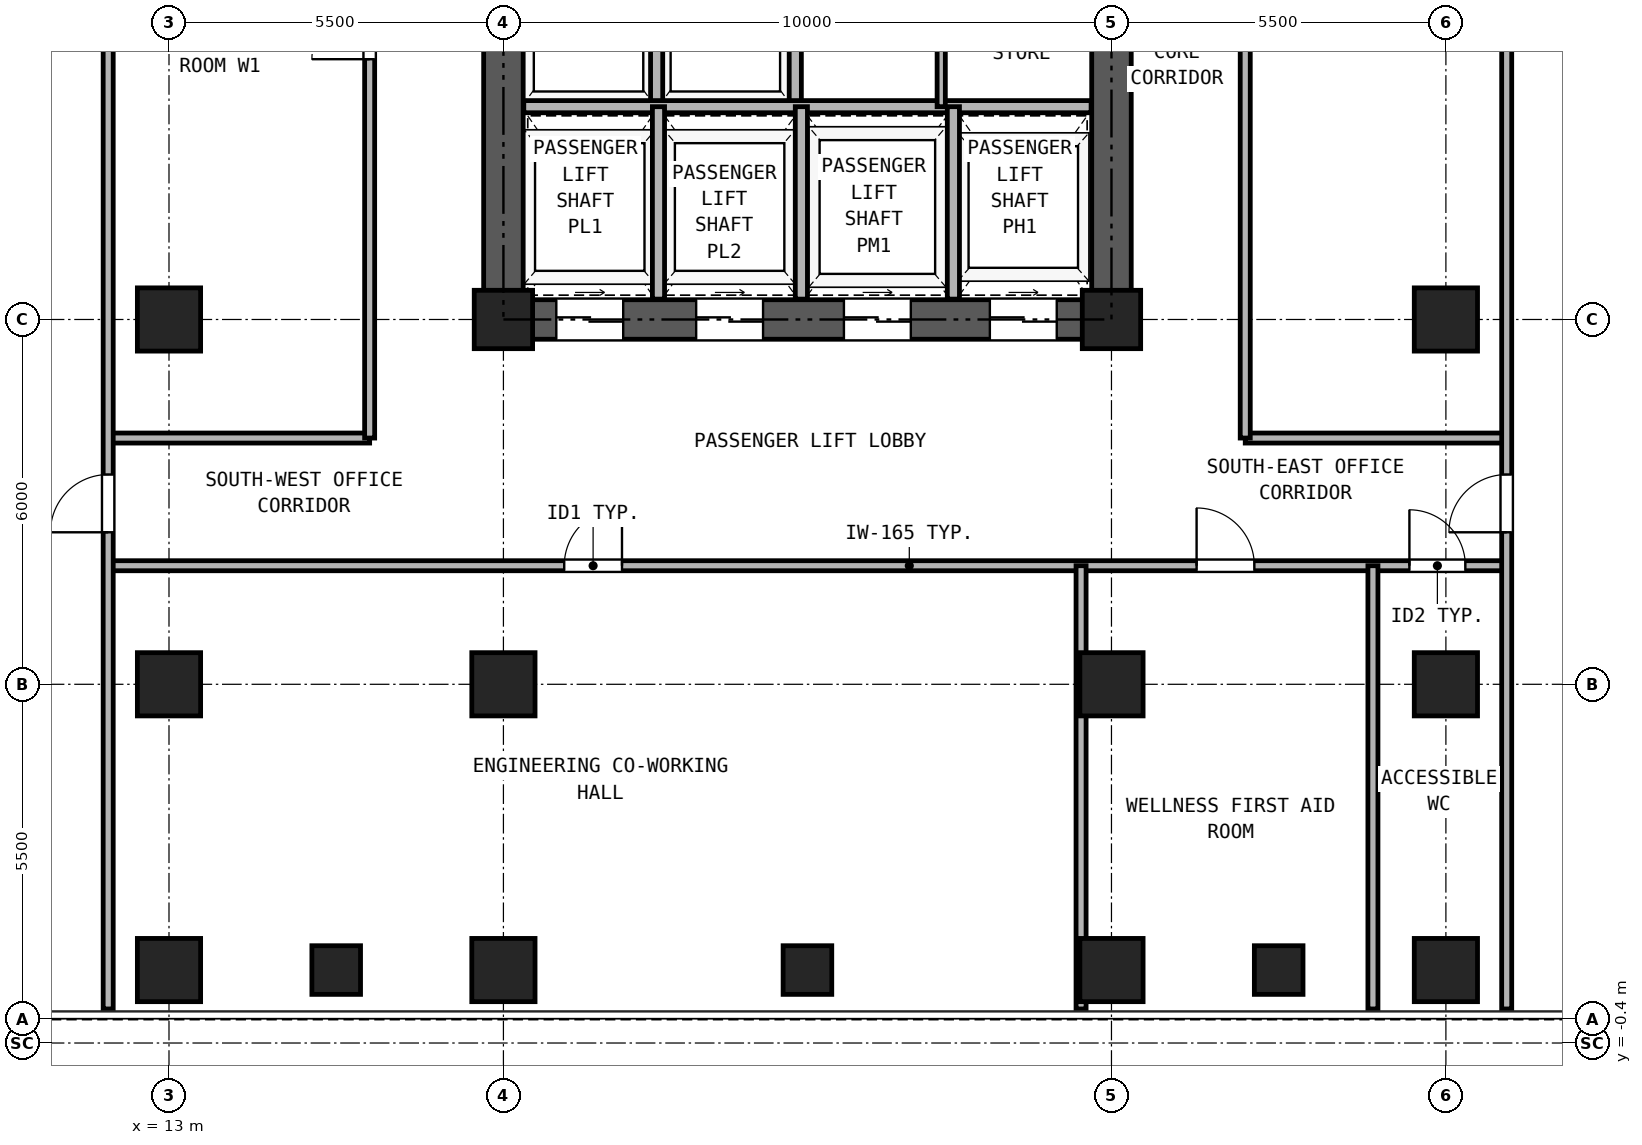
"""IFC4 building model, lengths in metres.
Left out: names, types, materials, properties, quantities, classifications, styles, units other than length and angle.
Written with IfcOpenShell. Run it as: python <this file> out.ifc"""

import sys

from ifc_helpers import new_model, si_unit, direction, frame, frame_2d, origin, origin_2d, place, context, subcontext, project, spatial, rectangle, hollow_rectangle, extrude, source, transform, mapped, element, fill, save


model = new_model("IFC4")
c1 = context("Model", 3, precision=1e-05, world=origin(), true_north=direction((0.0, 1.0)))
c2 = subcontext(c1, "Body", "Model", "MODEL_VIEW")
j1 = project(units=[si_unit("LENGTHUNIT", "METRE"), si_unit("PLANEANGLEUNIT", "RADIAN")], contexts=[c1])
p1 = place(None, origin())
s1 = spatial("IfcSite", under=j1, at=p1, CompositionType="ELEMENT")
p2 = place(p1, origin())
s2 = spatial("IfcBuilding", under=s1, at=p2, CompositionType="ELEMENT")
p3 = place(p2, frame((0.0, 0.0, 58.5)))
s3 = spatial("IfcBuildingStorey", under=s2, at=p3, CompositionType="ELEMENT", Elevation=58.5)
m1 = source(origin(), c2, "Body", "SweptSolid", [
    extrude(hollow_rectangle(XDim=1.04, YDim=1.04, WallThickness=0.065, at=origin_2d()), origin(), (0.0, 0.0, 1.0), 3.32),
])
for number, where, z_axis, x_axis in (
    (1, (13.0, 0.8, 0.0), (0.0, 0.0, 1.0), (1.0, 0.0, 0.0)),
    (2, (18.5, 0.8, 0.0), (0.0, 0.0, 1.0), (1.0, 0.0, 0.0)),
    (3, (28.5, 0.8, 0.0), (0.0, 0.0, 1.0), (1.0, 0.0, 0.0)),
    (4, (34.0, 0.8, 0.0), (0.0, 0.0, 1.0), (1.0, 0.0, 0.0)),
    (5, (13.0, 5.5, 0.0), (0.0, 0.0, 1.0), (1.0, 0.0, 0.0)),
    (6, (13.0, 11.5, 0.0), (0.0, 0.0, 1.0), (1.0, 0.0, 0.0)),
    (7, (18.5, 5.5, 0.0), (0.0, 0.0, 1.0), (1.0, 0.0, 0.0)),
):
    element("IfcColumn", number, at=place(p3, frame(where, z_axis=z_axis, x_axis=x_axis)), inside=s3, PredefinedType="COLUMN", context=c2, shape_type="MappedRepresentation", body=[
        mapped(m1, transform((0.0, 0.0, 0.0), x_axis=(1.0, 0.0, 0.0), y_axis=(0.0, 1.0, 0.0), z_axis=(0.0, 0.0, 1.0), scale=1.0)),
    ])
m2 = source(origin(), c2, "Body", "SweptSolid", [
    extrude(hollow_rectangle(XDim=0.96, YDim=0.96, WallThickness=0.06, at=origin_2d()), origin(), (0.0, 0.0, 1.0), 3.32),
])
p4 = place(p3, frame((18.5, 11.5, 0.0), z_axis=(0.0, 0.0, 1.0), x_axis=(1.0, 0.0, 0.0)))
e8 = element("IfcColumn", 8, at=p4, inside=s3, PredefinedType="COLUMN", context=c2, shape_type="MappedRepresentation", body=[
    mapped(m2, transform((0.0, 0.0, 0.0), x_axis=(1.0, 0.0, 0.0), y_axis=(0.0, 1.0, 0.0), z_axis=(0.0, 0.0, 1.0), scale=1.0)),
])
p5 = place(p3, frame((28.5, 5.5, 0.0), z_axis=(0.0, 0.0, 1.0), x_axis=(1.0, 0.0, 0.0)))
e9 = element("IfcColumn", 9, at=p5, inside=s3, PredefinedType="COLUMN", context=c2, shape_type="MappedRepresentation", body=[
    mapped(m1, transform((0.0, 0.0, 0.0), x_axis=(1.0, 0.0, 0.0), y_axis=(0.0, 1.0, 0.0), z_axis=(0.0, 0.0, 1.0), scale=1.0)),
])
p6 = place(p3, frame((28.5, 11.5, 0.0), z_axis=(0.0, 0.0, 1.0), x_axis=(1.0, 0.0, 0.0)))
e10 = element("IfcColumn", 10, at=p6, inside=s3, PredefinedType="COLUMN", context=c2, shape_type="MappedRepresentation", body=[
    mapped(m2, transform((0.0, 0.0, 0.0), x_axis=(1.0, 0.0, 0.0), y_axis=(0.0, 1.0, 0.0), z_axis=(0.0, 0.0, 1.0), scale=1.0)),
])
for number, where, z_axis, x_axis in (
    (11, (34.0, 5.5, 0.0), (0.0, 0.0, 1.0), (1.0, 0.0, 0.0)),
    (12, (34.0, 11.5, 0.0), (0.0, 0.0, 1.0), (1.0, 0.0, 0.0)),
):
    element("IfcColumn", number, at=place(p3, frame(where, z_axis=z_axis, x_axis=x_axis)), inside=s3, PredefinedType="COLUMN", context=c2, shape_type="MappedRepresentation", body=[
        mapped(m1, transform((0.0, 0.0, 0.0), x_axis=(1.0, 0.0, 0.0), y_axis=(0.0, 1.0, 0.0), z_axis=(0.0, 0.0, 1.0), scale=1.0)),
    ])
m3 = source(origin(), c2, "Body", "SweptSolid", [
    extrude(hollow_rectangle(XDim=0.8, YDim=0.8, WallThickness=0.045, at=origin_2d()), origin(), (0.0, 0.0, 1.0), 3.32),
])
for number, where, z_axis, x_axis in (
    (13, (15.75, 0.8, 0.0), (0.0, 0.0, 1.0), (1.0, 0.0, 0.0)),
    (14, (23.5, 0.8, 0.0), (0.0, 0.0, 1.0), (1.0, 0.0, 0.0)),
    (15, (31.25, 0.8, 0.0), (0.0, 0.0, 1.0), (1.0, 0.0, 0.0)),
):
    element("IfcColumn", number, at=place(p3, frame(where, z_axis=z_axis, x_axis=x_axis)), inside=s3, PredefinedType="COLUMN", context=c2, shape_type="MappedRepresentation", body=[
        mapped(m3, transform((0.0, 0.0, 0.0), x_axis=(1.0, 0.0, 0.0), y_axis=(0.0, 1.0, 0.0), z_axis=(0.0, 0.0, 1.0), scale=1.0)),
    ])
p7 = place(p3, frame((18.175, 11.5, 0.0), z_axis=(0.0, 0.0, 1.0), x_axis=(1.0, 0.0, 0.0)))
e16 = element("IfcWall", 16, at=p7, inside=s3, PredefinedType="SHEAR", context=c2, shape_type="SweptSolid", body=[
    extrude(rectangle(XDim=10.65, YDim=0.65, at=frame_2d((5.325, 0.0))), origin(), (0.0, 0.0, 1.0), 3.32),
])
p8 = place(p7, frame((1.195, 0.0, 0.0)))
e17 = element("IfcOpeningElement", 17, at=p8, cuts=e16, PredefinedType="OPENING", context=c2, shape_type="SweptSolid", body=[
    extrude(rectangle(XDim=1.1, YDim=2.25, at=frame_2d((0.55, 1.125))), frame((0.0, 0.335, 0.0), z_axis=(0.0, -1.0, 0.0), x_axis=(1.0, 0.0, 0.0)), (0.0, 0.0, 1.0), 0.67),
])
p9 = place(p7, frame((3.495, 0.0, 0.0)))
e18 = element("IfcOpeningElement", 18, at=p9, cuts=e16, PredefinedType="OPENING", context=c2, shape_type="SweptSolid", body=[
    extrude(rectangle(XDim=1.1, YDim=2.25, at=frame_2d((0.55, 1.125))), frame((0.0, 0.335, 0.0), z_axis=(0.0, -1.0, 0.0), x_axis=(1.0, 0.0, 0.0)), (0.0, 0.0, 1.0), 0.67),
])
p10 = place(p7, frame((5.925, 0.0, 0.0)))
e19 = element("IfcOpeningElement", 19, at=p10, cuts=e16, PredefinedType="OPENING", context=c2, shape_type="SweptSolid", body=[
    extrude(rectangle(XDim=1.1, YDim=2.25, at=frame_2d((0.55, 1.125))), frame((0.0, 0.335, 0.0), z_axis=(0.0, -1.0, 0.0), x_axis=(1.0, 0.0, 0.0)), (0.0, 0.0, 1.0), 0.67),
])
p11 = place(p7, frame((8.325, 0.0, 0.0)))
e20 = element("IfcOpeningElement", 20, at=p11, cuts=e16, PredefinedType="OPENING", context=c2, shape_type="SweptSolid", body=[
    extrude(rectangle(XDim=1.1, YDim=2.25, at=frame_2d((0.55, 1.125))), frame((0.0, 0.335, 0.0), z_axis=(0.0, -1.0, 0.0), x_axis=(1.0, 0.0, 0.0)), (0.0, 0.0, 1.0), 0.67),
])
p12 = place(p3, frame((18.5, 11.825, 0.0), z_axis=(0.0, 0.0, 1.0), x_axis=(0.0, 1.0, 0.0)))
e21 = element("IfcWall", 21, at=p12, inside=s3, PredefinedType="SHEAR", context=c2, shape_type="SweptSolid", body=[
    extrude(rectangle(XDim=16.6, YDim=0.65, at=frame_2d((8.3, 0.0))), origin(), (0.0, 0.0, 1.0), 3.32),
])
p13 = place(p12, frame((7.325, 0.0, 0.0)))
e22 = element("IfcOpeningElement", 22, at=p13, cuts=e21, PredefinedType="OPENING", context=c2, shape_type="SweptSolid", body=[
    extrude(rectangle(XDim=1.15, YDim=2.2, at=frame_2d((0.575, 1.1))), frame((0.0, 0.335, 0.0), z_axis=(0.0, -1.0, 0.0), x_axis=(1.0, 0.0, 0.0)), (0.0, 0.0, 1.0), 0.67),
])
p14 = place(p3, frame((28.5, 11.825, 0.0), z_axis=(0.0, 0.0, 1.0), x_axis=(0.0, 1.0, 0.0)))
e23 = element("IfcWall", 23, at=p14, inside=s3, PredefinedType="SHEAR", context=c2, shape_type="SweptSolid", body=[
    extrude(rectangle(XDim=16.6, YDim=0.65, at=frame_2d((8.3, 0.0))), origin(), (0.0, 0.0, 1.0), 3.32),
])
p15 = place(p14, frame((7.325, 0.0, 0.0)))
e24 = element("IfcOpeningElement", 24, at=p15, cuts=e23, PredefinedType="OPENING", context=c2, shape_type="SweptSolid", body=[
    extrude(rectangle(XDim=1.15, YDim=2.2, at=frame_2d((0.575, 1.1))), frame((0.0, 0.335, 0.0), z_axis=(0.0, -1.0, 0.0), x_axis=(1.0, 0.0, 0.0)), (0.0, 0.0, 1.0), 0.67),
])
for number, where, z_axis, x_axis in (
    (25, (21.02, 15.0, 0.0), (0.0, 0.0, 1.0), (0.0, 1.0, 0.0)),
    (26, (23.3, 15.0, 0.0), (0.0, 0.0, 1.0), (0.0, 1.0, 0.0)),
):
    element("IfcWall", number, at=place(p3, frame(where, z_axis=z_axis, x_axis=x_axis)), inside=s3, PredefinedType="PARTITIONING", context=c2, shape_type="SweptSolid", body=[
        extrude(rectangle(XDim=3.0, YDim=0.2, at=frame_2d((1.5, 0.0))), origin(), (0.0, 0.0, 1.0), 3.32),
    ])
p16 = place(p3, frame((18.835, 15.0, 0.0), z_axis=(0.0, 0.0, 1.0), x_axis=(1.0, 0.0, 0.0)))
e27 = element("IfcWall", 27, at=p16, inside=s3, PredefinedType="PARTITIONING", context=c2, shape_type="SweptSolid", body=[
    extrude(rectangle(XDim=9.33, YDim=0.2, at=frame_2d((4.665, 0.0))), origin(), (0.0, 0.0, 1.0), 3.32),
])
p17 = place(p3, frame((25.7, 15.0, 0.0), z_axis=(0.0, 0.0, 1.0), x_axis=(0.0, 1.0, 0.0)))
e28 = element("IfcWall", 28, at=p17, inside=s3, PredefinedType="PARTITIONING", context=c2, shape_type="SweptSolid", body=[
    extrude(rectangle(XDim=3.0, YDim=0.135, at=frame_2d((1.5, 0.0))), origin(), (0.0, 0.0, 1.0), 3.32),
])
for number, where, z_axis, x_axis in (
    (29, (21.05, 11.835, 0.0), (0.0, 0.0, 1.0), (0.0, 1.0, 0.0)),
    (30, (23.4, 11.835, 0.0), (0.0, 0.0, 1.0), (0.0, 1.0, 0.0)),
    (31, (25.9, 11.835, 0.0), (0.0, 0.0, 1.0), (0.0, 1.0, 0.0)),
):
    element("IfcWall", number, at=place(p3, frame(where, z_axis=z_axis, x_axis=x_axis)), inside=s3, PredefinedType="PARTITIONING", context=c2, shape_type="SweptSolid", body=[
        extrude(rectangle(XDim=3.165, YDim=0.2, at=frame_2d((1.583, 0.0))), origin(), (0.0, 0.0, 1.0), 3.32),
    ])
p18 = place(p3, frame((12.0, 7.45, 0.0), z_axis=(0.0, 0.0, 1.0), x_axis=(1.0, 0.0, 0.0)))
e32 = element("IfcWall", 32, at=p18, inside=s3, PredefinedType="PARTITIONING", context=c2, shape_type="SweptSolid", body=[
    extrude(rectangle(XDim=23.0, YDim=0.165, at=frame_2d((11.5, 0.0))), origin(), (0.0, 0.0, 1.0), 3.32),
])
p19 = place(p18, frame((7.5, 0.0, 0.0)))
e33 = element("IfcOpeningElement", 33, at=p19, cuts=e32, PredefinedType="OPENING", context=c2, shape_type="SweptSolid", body=[
    extrude(rectangle(XDim=0.95, YDim=2.15, at=frame_2d((0.475, 1.075))), frame((0.0, 0.093, 0.0), z_axis=(0.0, -1.0, 0.0), x_axis=(1.0, 0.0, 0.0)), (0.0, 0.0, 1.0), 0.185),
])
p20 = place(p18, frame((17.9, 0.0, 0.0)))
e34 = element("IfcOpeningElement", 34, at=p20, cuts=e32, PredefinedType="OPENING", context=c2, shape_type="SweptSolid", body=[
    extrude(rectangle(XDim=0.95, YDim=2.15, at=frame_2d((0.475, 1.075))), frame((0.0, 0.093, 0.0), z_axis=(0.0, -1.0, 0.0), x_axis=(1.0, 0.0, 0.0)), (0.0, 0.0, 1.0), 0.185),
])
p21 = place(p18, frame((21.4, 0.0, 0.0)))
e35 = element("IfcOpeningElement", 35, at=p21, cuts=e32, PredefinedType="OPENING", context=c2, shape_type="SweptSolid", body=[
    extrude(rectangle(XDim=0.92, YDim=2.1, at=frame_2d((0.46, 1.05))), frame((0.0, 0.093, 0.0), z_axis=(0.0, -1.0, 0.0), x_axis=(1.0, 0.0, 0.0)), (0.0, 0.0, 1.0), 0.185),
])
for number, where, z_axis, x_axis in (
    (36, (12.0, 9.55, 0.0), (0.0, 0.0, 1.0), (1.0, 0.0, 0.0)),
    (37, (30.7, 9.55, 0.0), (0.0, 0.0, 1.0), (1.0, 0.0, 0.0)),
):
    element("IfcWall", number, at=place(p3, frame(where, z_axis=z_axis, x_axis=x_axis)), inside=s3, PredefinedType="PARTITIONING", context=c2, shape_type="SweptSolid", body=[
        extrude(rectangle(XDim=4.3, YDim=0.165, at=frame_2d((2.15, 0.0))), origin(), (0.0, 0.0, 1.0), 3.32),
    ])
p22 = place(p3, frame((16.3, 9.55, 0.0), z_axis=(0.0, 0.0, 1.0), x_axis=(0.0, 1.0, 0.0)))
e38 = element("IfcWall", 38, at=p22, inside=s3, PredefinedType="PARTITIONING", context=c2, shape_type="SweptSolid", body=[
    extrude(rectangle(XDim=20.9, YDim=0.165, at=frame_2d((10.45, 0.0))), origin(), (0.0, 0.0, 1.0), 3.32),
])
p23 = place(p22, frame((6.231, 0.0, 0.0)))
e39 = element("IfcOpeningElement", 39, at=p23, cuts=e38, PredefinedType="OPENING", context=c2, shape_type="SweptSolid", body=[
    extrude(rectangle(XDim=0.95, YDim=2.15, at=frame_2d((0.475, 1.075))), frame((0.0, 0.093, 0.0), z_axis=(0.0, -1.0, 0.0), x_axis=(1.0, 0.0, 0.0)), (0.0, 0.0, 1.0), 0.185),
])
p24 = place(p22, frame((16.681, 0.0, 0.0)))
e40 = element("IfcOpeningElement", 40, at=p24, cuts=e38, PredefinedType="OPENING", context=c2, shape_type="SweptSolid", body=[
    extrude(rectangle(XDim=0.95, YDim=2.15, at=frame_2d((0.475, 1.075))), frame((0.0, 0.093, 0.0), z_axis=(0.0, -1.0, 0.0), x_axis=(1.0, 0.0, 0.0)), (0.0, 0.0, 1.0), 0.185),
])
p25 = place(p3, frame((30.7, 9.55, 0.0), z_axis=(0.0, 0.0, 1.0), x_axis=(0.0, 1.0, 0.0)))
e41 = element("IfcWall", 41, at=p25, inside=s3, PredefinedType="PARTITIONING", context=c2, shape_type="SweptSolid", body=[
    extrude(rectangle(XDim=20.9, YDim=0.165, at=frame_2d((10.45, 0.0))), origin(), (0.0, 0.0, 1.0), 3.32),
])
p26 = place(p25, frame((9.95, 0.0, 0.0)))
e42 = element("IfcOpeningElement", 42, at=p26, cuts=e41, PredefinedType="OPENING", context=c2, shape_type="SweptSolid", body=[
    extrude(rectangle(XDim=0.95, YDim=2.15, at=frame_2d((0.475, 1.075))), frame((0.0, 0.093, 0.0), z_axis=(0.0, -1.0, 0.0), x_axis=(1.0, 0.0, 0.0)), (0.0, 0.0, 1.0), 0.185),
])
p27 = place(p3, frame((12.0, 0.16, 0.0), z_axis=(0.0, 0.0, 1.0), x_axis=(0.0, 1.0, 0.0)))
e43 = element("IfcWall", 43, at=p27, inside=s3, PredefinedType="PARTITIONING", context=c2, shape_type="SweptSolid", body=[
    extrude(rectangle(XDim=40.18, YDim=0.165, at=frame_2d((20.09, 0.0))), origin(), (0.0, 0.0, 1.0), 3.32),
])
p28 = place(p27, frame((7.84, 0.0, 0.0)))
e44 = element("IfcOpeningElement", 44, at=p28, cuts=e43, PredefinedType="OPENING", context=c2, shape_type="SweptSolid", body=[
    extrude(rectangle(XDim=0.95, YDim=2.15, at=frame_2d((0.475, 1.075))), frame((0.0, 0.093, 0.0), z_axis=(0.0, -1.0, 0.0), x_axis=(1.0, 0.0, 0.0)), (0.0, 0.0, 1.0), 0.185),
])
p29 = place(p27, frame((30.84, 0.0, 0.0)))
e45 = element("IfcOpeningElement", 45, at=p29, cuts=e43, PredefinedType="OPENING", context=c2, shape_type="SweptSolid", body=[
    extrude(rectangle(XDim=0.95, YDim=2.15, at=frame_2d((0.475, 1.075))), frame((0.0, 0.093, 0.0), z_axis=(0.0, -1.0, 0.0), x_axis=(1.0, 0.0, 0.0)), (0.0, 0.0, 1.0), 0.185),
])
p30 = place(p3, frame((35.0, 0.16, 0.0), z_axis=(0.0, 0.0, 1.0), x_axis=(0.0, 1.0, 0.0)))
e46 = element("IfcWall", 46, at=p30, inside=s3, PredefinedType="PARTITIONING", context=c2, shape_type="SweptSolid", body=[
    extrude(rectangle(XDim=40.18, YDim=0.165, at=frame_2d((20.09, 0.0))), origin(), (0.0, 0.0, 1.0), 3.32),
])
p31 = place(p30, frame((7.84, 0.0, 0.0)))
e47 = element("IfcOpeningElement", 47, at=p31, cuts=e46, PredefinedType="OPENING", context=c2, shape_type="SweptSolid", body=[
    extrude(rectangle(XDim=0.95, YDim=2.15, at=frame_2d((0.475, 1.075))), frame((0.0, 0.093, 0.0), z_axis=(0.0, -1.0, 0.0), x_axis=(1.0, 0.0, 0.0)), (0.0, 0.0, 1.0), 0.185),
])
p32 = place(p30, frame((30.84, 0.0, 0.0)))
e48 = element("IfcOpeningElement", 48, at=p32, cuts=e46, PredefinedType="OPENING", context=c2, shape_type="SweptSolid", body=[
    extrude(rectangle(XDim=0.95, YDim=2.15, at=frame_2d((0.475, 1.075))), frame((0.0, 0.093, 0.0), z_axis=(0.0, -1.0, 0.0), x_axis=(1.0, 0.0, 0.0)), (0.0, 0.0, 1.0), 0.185),
])
for number, where, z_axis, x_axis in (
    (49, (28.0, 0.16, 0.0), (0.0, 0.0, 1.0), (0.0, 1.0, 0.0)),
    (50, (32.8, 0.16, 0.0), (0.0, 0.0, 1.0), (0.0, 1.0, 0.0)),
):
    element("IfcWall", number, at=place(p3, frame(where, z_axis=z_axis, x_axis=x_axis)), inside=s3, PredefinedType="PARTITIONING", context=c2, shape_type="SweptSolid", body=[
        extrude(rectangle(XDim=7.29, YDim=0.165, at=frame_2d((3.645, 0.0))), origin(), (0.0, 0.0, 1.0), 3.32),
    ])
p33 = place(p8, frame((1.1, 0.0, 0.0), z_axis=(0.0, 0.0, 1.0), x_axis=(-1.0, 0.0, 0.0)))
e51 = element("IfcDoor", 51, at=p33, inside=s3, OperationType="DOUBLE_DOOR_SLIDING", PredefinedType="DOOR", context=c2, shape_type="SweptSolid", body=[
    extrude(rectangle(XDim=1.1, YDim=2.25, at=frame_2d((0.55, 1.125))), frame((0.0, 0.025, 0.0), z_axis=(0.0, -1.0, 0.0), x_axis=(1.0, 0.0, 0.0)), (0.0, 0.0, 1.0), 0.05),
])
fill(e17, e51)
p34 = place(p9, frame((1.1, 0.0, 0.0), z_axis=(0.0, 0.0, 1.0), x_axis=(-1.0, 0.0, 0.0)))
e52 = element("IfcDoor", 52, at=p34, inside=s3, OperationType="DOUBLE_DOOR_SLIDING", PredefinedType="DOOR", context=c2, shape_type="SweptSolid", body=[
    extrude(rectangle(XDim=1.1, YDim=2.25, at=frame_2d((0.55, 1.125))), frame((0.0, 0.025, 0.0), z_axis=(0.0, -1.0, 0.0), x_axis=(1.0, 0.0, 0.0)), (0.0, 0.0, 1.0), 0.05),
])
fill(e18, e52)
p35 = place(p10, frame((1.1, 0.0, 0.0), z_axis=(0.0, 0.0, 1.0), x_axis=(-1.0, 0.0, 0.0)))
e53 = element("IfcDoor", 53, at=p35, inside=s3, OperationType="DOUBLE_DOOR_SLIDING", PredefinedType="DOOR", context=c2, shape_type="SweptSolid", body=[
    extrude(rectangle(XDim=1.1, YDim=2.25, at=frame_2d((0.55, 1.125))), frame((0.0, 0.025, 0.0), z_axis=(0.0, -1.0, 0.0), x_axis=(1.0, 0.0, 0.0)), (0.0, 0.0, 1.0), 0.05),
])
fill(e19, e53)
p36 = place(p11, frame((1.1, 0.0, 0.0), z_axis=(0.0, 0.0, 1.0), x_axis=(-1.0, 0.0, 0.0)))
e54 = element("IfcDoor", 54, at=p36, inside=s3, OperationType="DOUBLE_DOOR_SLIDING", PredefinedType="DOOR", context=c2, shape_type="SweptSolid", body=[
    extrude(rectangle(XDim=1.1, YDim=2.25, at=frame_2d((0.55, 1.125))), frame((0.0, 0.025, 0.0), z_axis=(0.0, -1.0, 0.0), x_axis=(1.0, 0.0, 0.0)), (0.0, 0.0, 1.0), 0.05),
])
fill(e20, e54)
p37 = place(p19, frame((0.95, 0.0, 0.0), z_axis=(0.0, 0.0, 1.0), x_axis=(-1.0, 0.0, 0.0)))
e55 = element("IfcDoor", 55, at=p37, inside=s3, OperationType="SINGLE_SWING_RIGHT", PredefinedType="DOOR", context=c2, shape_type="SweptSolid", body=[
    extrude(rectangle(XDim=0.95, YDim=2.15, at=frame_2d((0.475, 1.075))), frame((0.0, 0.025, 0.0), z_axis=(0.0, -1.0, 0.0), x_axis=(1.0, 0.0, 0.0)), (0.0, 0.0, 1.0), 0.05),
])
fill(e33, e55)
p38 = place(p20, frame((0.95, 0.0, 0.0), z_axis=(0.0, 0.0, 1.0), x_axis=(-1.0, 0.0, 0.0)))
e56 = element("IfcDoor", 56, at=p38, inside=s3, OperationType="SINGLE_SWING_LEFT", PredefinedType="DOOR", context=c2, shape_type="SweptSolid", body=[
    extrude(rectangle(XDim=0.95, YDim=2.15, at=frame_2d((0.475, 1.075))), frame((0.0, 0.025, 0.0), z_axis=(0.0, -1.0, 0.0), x_axis=(1.0, 0.0, 0.0)), (0.0, 0.0, 1.0), 0.05),
])
fill(e34, e56)
p39 = place(p21, frame((0.92, 0.0, 0.0), z_axis=(0.0, 0.0, 1.0), x_axis=(-1.0, 0.0, 0.0)))
e57 = element("IfcDoor", 57, at=p39, inside=s3, OperationType="SINGLE_SWING_LEFT", PredefinedType="DOOR", context=c2, shape_type="SweptSolid", body=[
    extrude(rectangle(XDim=0.92, YDim=2.1, at=frame_2d((0.46, 1.05))), frame((0.0, 0.025, 0.0), z_axis=(0.0, -1.0, 0.0), x_axis=(1.0, 0.0, 0.0)), (0.0, 0.0, 1.0), 0.05),
])
fill(e35, e57)
p40 = place(p28, frame((0.95, 0.0, 0.0), z_axis=(0.0, 0.0, 1.0), x_axis=(-1.0, 0.0, 0.0)))
e58 = element("IfcDoor", 58, at=p40, inside=s3, OperationType="SINGLE_SWING_LEFT", PredefinedType="DOOR", context=c2, shape_type="SweptSolid", body=[
    extrude(rectangle(XDim=0.95, YDim=2.15, at=frame_2d((0.475, 1.075))), frame((0.0, 0.025, 0.0), z_axis=(0.0, -1.0, 0.0), x_axis=(1.0, 0.0, 0.0)), (0.0, 0.0, 1.0), 0.05),
])
fill(e44, e58)
p41 = place(p31, origin())
e59 = element("IfcDoor", 59, at=p41, inside=s3, OperationType="SINGLE_SWING_LEFT", PredefinedType="DOOR", context=c2, shape_type="SweptSolid", body=[
    extrude(rectangle(XDim=0.95, YDim=2.15, at=frame_2d((0.475, 1.075))), frame((0.0, 0.025, 0.0), z_axis=(0.0, -1.0, 0.0), x_axis=(1.0, 0.0, 0.0)), (0.0, 0.0, 1.0), 0.05),
])
fill(e47, e59)
p42 = place(p23, frame((0.95, 0.0, 0.0), z_axis=(0.0, 0.0, 1.0), x_axis=(-1.0, 0.0, 0.0)))
e60 = element("IfcDoor", 60, at=p42, inside=s3, OperationType="SINGLE_SWING_LEFT", PredefinedType="DOOR", context=c2, shape_type="SweptSolid", body=[
    extrude(rectangle(XDim=0.95, YDim=2.15, at=frame_2d((0.475, 1.075))), frame((0.0, 0.025, 0.0), z_axis=(0.0, -1.0, 0.0), x_axis=(1.0, 0.0, 0.0)), (0.0, 0.0, 1.0), 0.05),
])
fill(e39, e60)
save(model, sys.argv[1])
